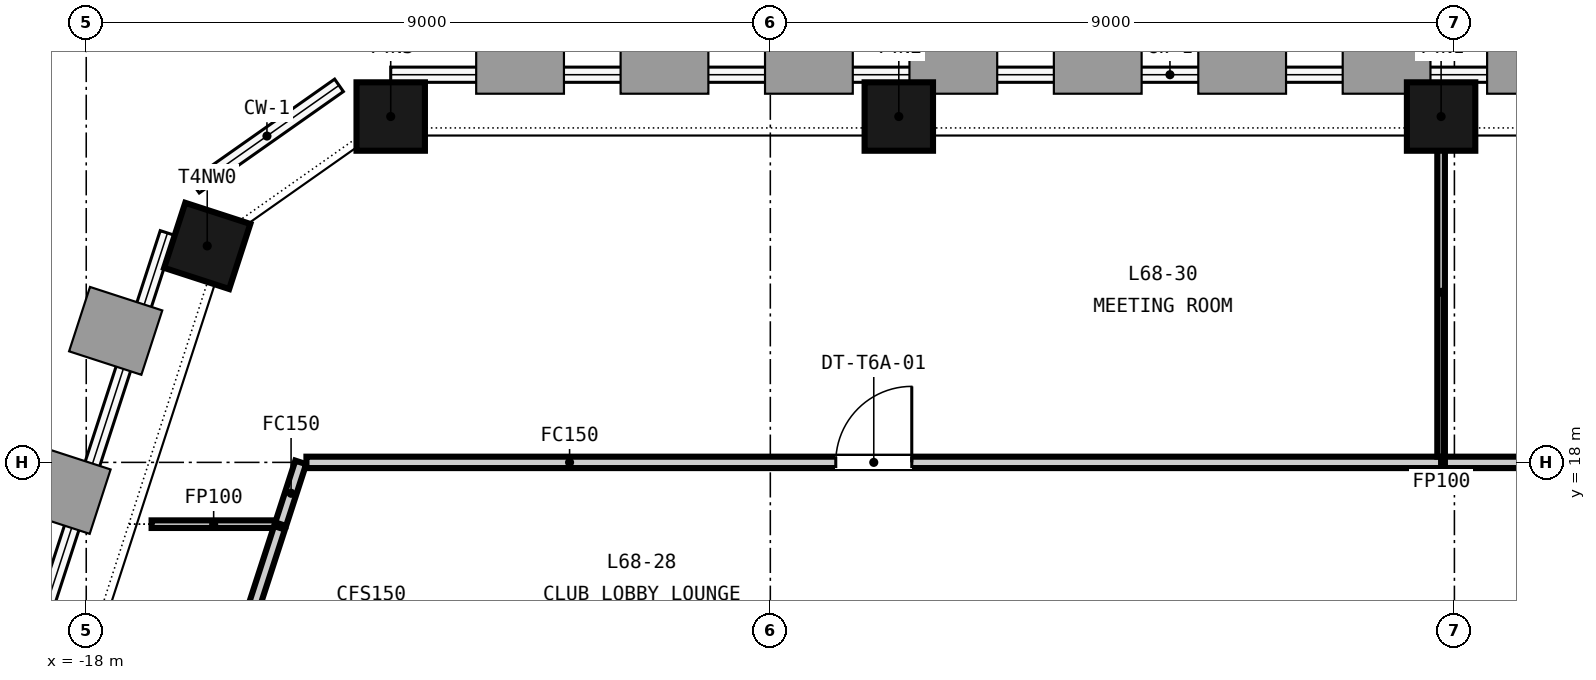
"""IFC4 building model, lengths in metres.
Left out: names, types, materials, properties, quantities, classifications, styles, units other than length and angle.
Written with IfcOpenShell. Run it as: python <this file> out.ifc"""

import sys

from ifc_helpers import new_model, si_unit, direction, frame, frame_2d, origin, origin_2d, place, context, subcontext, project, spatial, rectangle, extrude, element, fill, save


model = new_model("IFC4")
c1 = context("Model", 3, precision=1e-05, world=origin(), true_north=direction((0.0, 1.0)))
c2 = subcontext(c1, "Body", "Model", "MODEL_VIEW")
j1 = project(units=[si_unit("LENGTHUNIT", "METRE"), si_unit("PLANEANGLEUNIT", "RADIAN")], contexts=[c1])
p1 = place(None, origin())
s1 = spatial("IfcSite", under=j1, at=p1, CompositionType="ELEMENT")
p2 = place(p1, origin())
s2 = spatial("IfcBuilding", under=s1, at=p2, CompositionType="ELEMENT")
p3 = place(p2, frame((0.0, 0.0, 268.25)))
s3 = spatial("IfcBuildingStorey", under=s2, at=p3, CompositionType="ELEMENT", Elevation=268.25)
for number, where, z_axis, x_axis in (
    (1, (-0.175, 22.55, -0.15), (0.0, 0.0, 1.0), (-1.0, 0.0, 0.0)),
    (2, (-7.31, 22.55, -0.15), (0.0, 0.0, 1.0), (-1.0, 0.0, 0.0)),
    (3, (-13.994, 22.55, -0.15), (0.0, 0.0, 1.0), (-1.0, 0.0, 0.0)),
    (4, (-16.408, 20.848, -0.15), (0.0, 0.0, 1.0), (-0.309, -0.951, 0.0)),
):
    element("IfcColumn", number, at=place(p3, frame(where, z_axis=z_axis, x_axis=x_axis)), inside=s3, PredefinedType="COLUMN", context=c2, shape_type="SweptSolid", body=[
        extrude(rectangle(XDim=0.9, YDim=0.9, at=origin_2d()), origin(), (0.0, 0.0, 1.0), 3.65),
    ])
p4 = place(p3, frame((-15.442, 17.187, 0.0), z_axis=(0.0, 0.0, 1.0), x_axis=(0.308763129345, 0.951138964588, 0.0)))
e5 = element("IfcWall", 5, at=p4, inside=s3, PredefinedType="PARTITIONING", context=c2, shape_type="SweptSolid", body=[
    extrude(rectangle(XDim=0.855, YDim=0.15, at=frame_2d((0.427, 0.0))), origin(), (0.0, 0.0, 1.0), 2.751),
])
p5 = place(p3, frame((-15.103, 18.0, 0.0), z_axis=(0.0, 0.0, 1.0), x_axis=(1.0, 0.0, 0.0)))
e6 = element("IfcWall", 6, at=p5, inside=s3, PredefinedType="PARTITIONING", context=c2, shape_type="SweptSolid", body=[
    extrude(rectangle(XDim=14.928, YDim=0.15, at=frame_2d((7.464, 0.0))), origin(), (0.0, 0.0, 1.0), 2.751),
])
p6 = place(p5, frame((6.964, 0.0, 0.0)))
e7 = element("IfcOpeningElement", 7, at=p6, cuts=e6, PredefinedType="OPENING", context=c2, shape_type="SweptSolid", body=[
    extrude(rectangle(XDim=1.0, YDim=2.1, at=frame_2d((0.5, 1.05))), frame((0.0, 0.085, 0.0), z_axis=(0.0, -1.0, 0.0), x_axis=(1.0, 0.0, 0.0)), (0.0, 0.0, 1.0), 0.17),
])
p7 = place(p3, frame((-0.175, 18.075, 0.0), z_axis=(0.0, 0.0, 1.0), x_axis=(0.0, 1.0, 0.0)))
e8 = element("IfcWall", 8, at=p7, inside=s3, PredefinedType="PARTITIONING", context=c2, shape_type="SweptSolid", body=[
    extrude(rectangle(XDim=4.325, YDim=0.1, at=frame_2d((2.163, 0.0))), origin(), (0.0, 0.0, 1.0), 2.751),
])
p8 = place(p3, frame((-17.14, 17.187, 0.0), z_axis=(0.0, 0.0, 1.0), x_axis=(1.0, 0.0, 0.0)))
e9 = element("IfcWall", 9, at=p8, inside=s3, PredefinedType="PARTITIONING", context=c2, shape_type="SweptSolid", body=[
    extrude(rectangle(XDim=1.623, YDim=0.1, at=frame_2d((0.812, 0.0))), origin(), (0.0, 0.0, 1.0), 2.751),
])
p9 = place(p3, frame((-0.125, 18.0, 0.0), z_axis=(0.0, 0.0, 1.0), x_axis=(1.0, 0.0, 0.0)))
e10 = element("IfcWall", 10, at=p9, inside=s3, PredefinedType="PARTITIONING", context=c2, shape_type="SweptSolid", body=[
    extrude(rectangle(XDim=10.827, YDim=0.15, at=frame_2d((5.414, 0.0))), origin(), (0.0, 0.0, 1.0), 2.751),
])
p10 = place(p9, frame((4.914, 0.0, 0.0)))
e11 = element("IfcOpeningElement", 11, at=p10, cuts=e10, PredefinedType="OPENING", context=c2, shape_type="SweptSolid", body=[
    extrude(rectangle(XDim=1.0, YDim=2.1, at=frame_2d((0.5, 1.05))), frame((0.0, 0.085, 0.0), z_axis=(0.0, -1.0, 0.0), x_axis=(1.0, 0.0, 0.0)), (0.0, 0.0, 1.0), 0.17),
])
p11 = place(p3, frame((-17.377, 11.232, 0.0), z_axis=(0.0, 0.0, 1.0), x_axis=(0.309001632963, 0.951061507383, 0.0)))
e12 = element("IfcWall", 12, at=p11, inside=s3, PredefinedType="PARTITIONING", context=c2, shape_type="SweptSolid", body=[
    extrude(rectangle(XDim=6.211, YDim=0.15, at=frame_2d((3.105, 0.0))), origin(), (0.0, 0.0, 1.0), 2.751),
])
p12 = place(p6, origin())
e13 = element("IfcDoor", 13, at=p12, inside=s3, OperationType="SINGLE_SWING_RIGHT", PredefinedType="DOOR", context=c2, shape_type="SweptSolid", body=[
    extrude(rectangle(XDim=1.0, YDim=2.1, at=frame_2d((0.5, 1.05))), frame((0.0, 0.025, 0.0), z_axis=(0.0, -1.0, 0.0), x_axis=(1.0, 0.0, 0.0)), (0.0, 0.0, 1.0), 0.05),
])
fill(e7, e13)
save(model, sys.argv[1])
